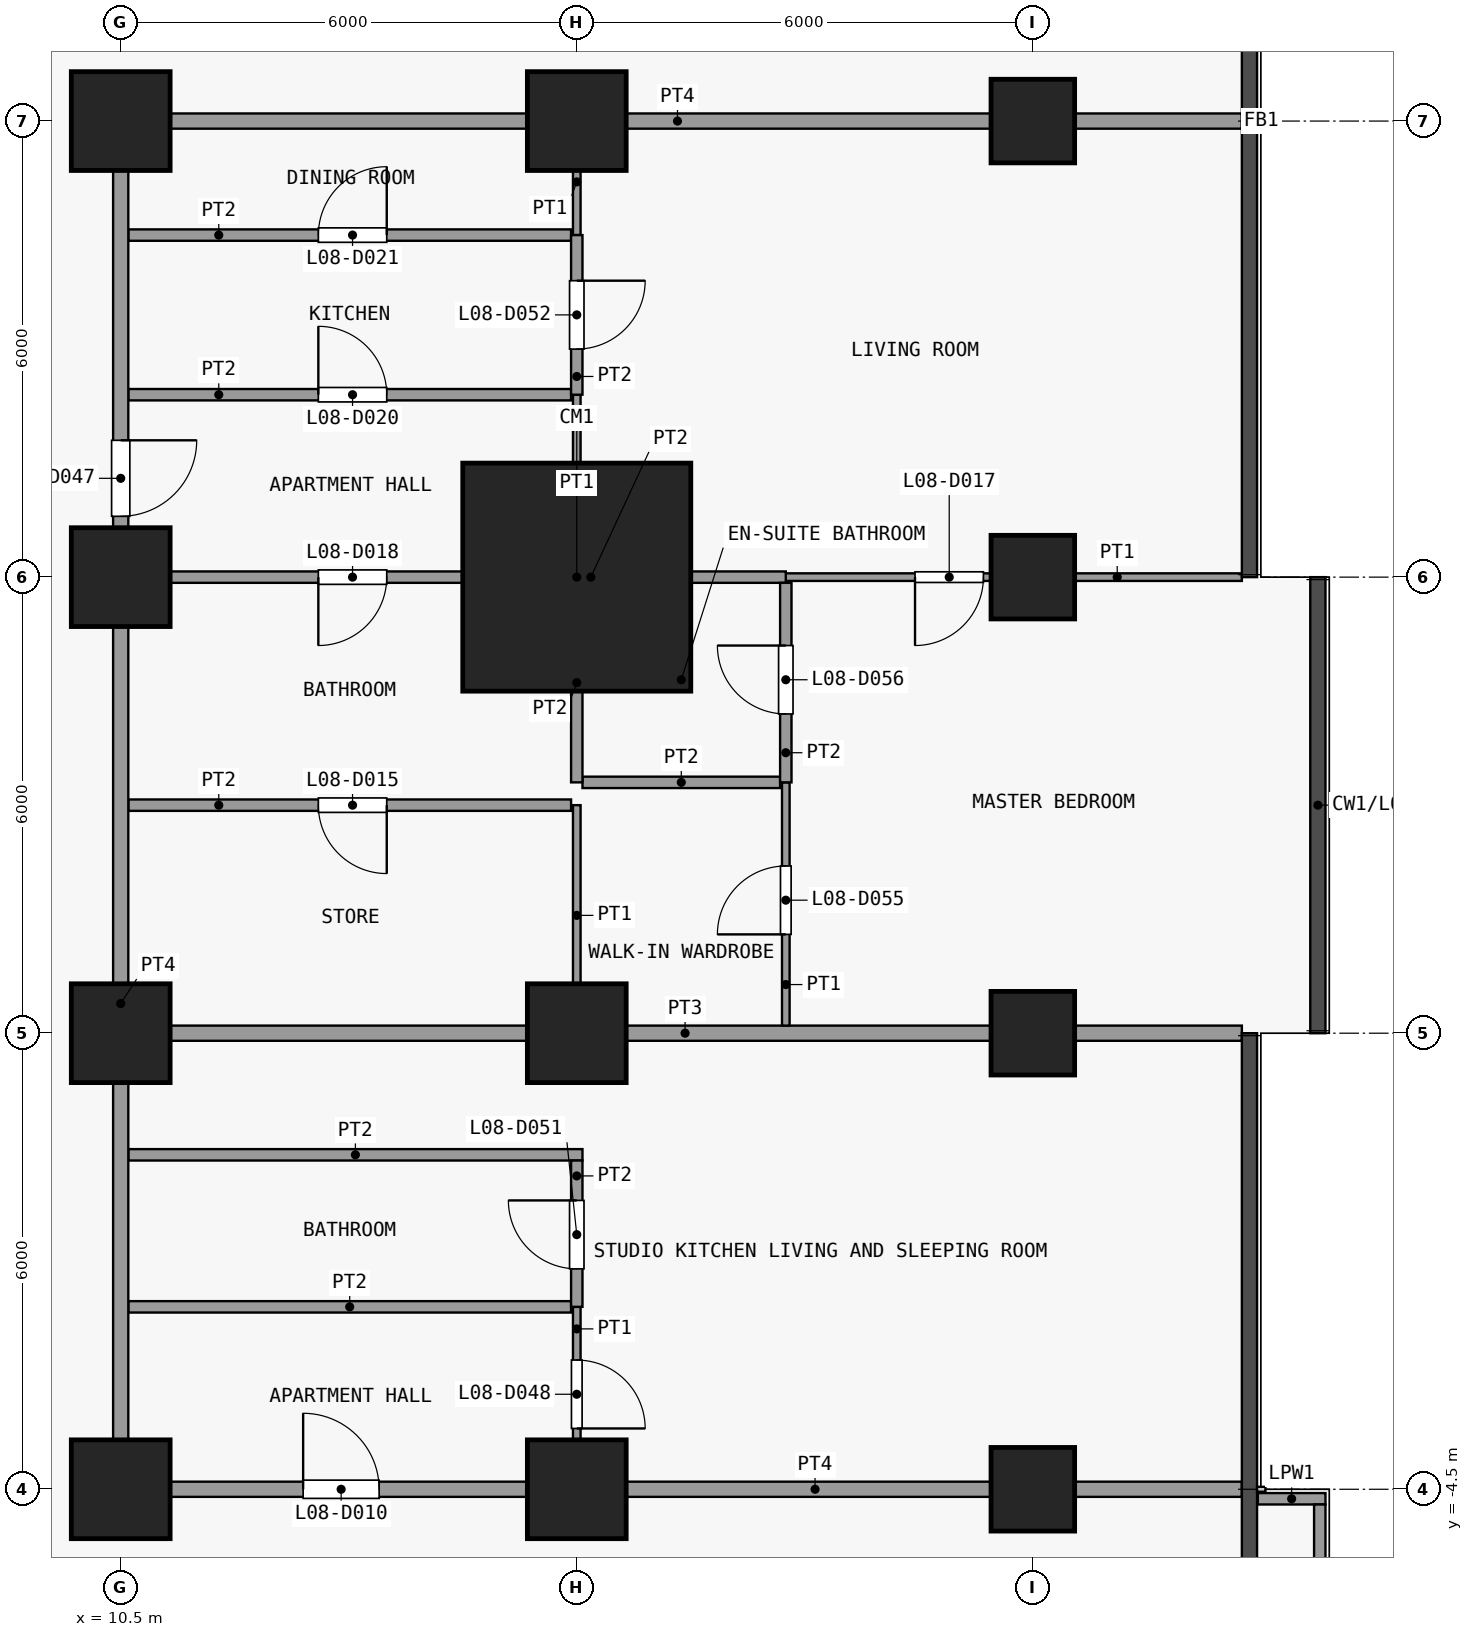
"""IFC4 building model, lengths in metres.
Left out: names, types, materials, properties, quantities, classifications, styles, units other than length and angle.
Written with IfcOpenShell. Run it as: python <this file> out.ifc"""

import sys

from ifc_helpers import new_model, si_unit, direction, frame, frame_2d, origin, origin_2d, place, context, subcontext, project, spatial, rectangle, extrude, element, fill, save


model = new_model("IFC4")
c1 = context("Model", 3, precision=1e-05, world=origin(), true_north=direction((0.0, 1.0)))
c2 = subcontext(c1, "Body", "Model", "MODEL_VIEW")
j1 = project(units=[si_unit("LENGTHUNIT", "METRE"), si_unit("PLANEANGLEUNIT", "RADIAN")], contexts=[c1])
p1 = place(None, origin())
s1 = spatial("IfcSite", under=j1, at=p1, CompositionType="ELEMENT")
p2 = place(p1, origin())
s2 = spatial("IfcBuilding", under=s1, at=p2, CompositionType="ELEMENT")
p3 = place(p2, frame((0.0, 0.0, 39.7)))
s3 = spatial("IfcBuildingStorey", under=s2, at=p3, CompositionType="ELEMENT", Elevation=39.7)
for number, where, z_axis, x_axis in (
    (1, (10.5, -4.5, 0.0), (0.0, 0.0, 1.0), (1.0, 0.0, 0.0)),
    (2, (10.5, 1.5, 0.0), (0.0, 0.0, 1.0), (1.0, 0.0, 0.0)),
    (3, (10.5, 7.5, 0.0), (0.0, 0.0, 1.0), (1.0, 0.0, 0.0)),
    (4, (10.5, 13.5, 0.0), (0.0, 0.0, 1.0), (1.0, 0.0, 0.0)),
    (5, (16.5, -4.5, 0.0), (0.0, 0.0, 1.0), (1.0, 0.0, 0.0)),
    (6, (16.5, 1.5, 0.0), (0.0, 0.0, 1.0), (1.0, 0.0, 0.0)),
):
    element("IfcColumn", number, at=place(p3, frame(where, z_axis=z_axis, x_axis=x_axis)), inside=s3, PredefinedType="COLUMN", context=c2, shape_type="SweptSolid", body=[
        extrude(rectangle(XDim=1.3, YDim=1.3, at=origin_2d()), origin(), (0.0, 0.0, 1.0), 3.6),
    ])
p4 = place(p3, frame((16.5, 7.5, 0.0), z_axis=(0.0, 0.0, 1.0), x_axis=(1.0, 0.0, 0.0)))
e7 = element("IfcColumn", 7, at=p4, inside=s3, PredefinedType="COLUMN", context=c2, shape_type="SweptSolid", body=[
    extrude(rectangle(XDim=3.0, YDim=3.0, at=origin_2d()), origin(), (0.0, 0.0, 1.0), 3.6),
])
p5 = place(p3, frame((16.5, 13.5, 0.0), z_axis=(0.0, 0.0, 1.0), x_axis=(1.0, 0.0, 0.0)))
e8 = element("IfcColumn", 8, at=p5, inside=s3, PredefinedType="COLUMN", context=c2, shape_type="SweptSolid", body=[
    extrude(rectangle(XDim=1.3, YDim=1.3, at=origin_2d()), origin(), (0.0, 0.0, 1.0), 3.6),
])
for number, where, z_axis, x_axis in (
    (9, (22.5, -4.5, 0.0), (0.0, 0.0, 1.0), (1.0, 0.0, 0.0)),
    (10, (22.5, 1.5, 0.0), (0.0, 0.0, 1.0), (1.0, 0.0, 0.0)),
    (11, (22.5, 7.5, 0.0), (0.0, 0.0, 1.0), (1.0, 0.0, 0.0)),
    (12, (22.5, 13.5, 0.0), (0.0, 0.0, 1.0), (1.0, 0.0, 0.0)),
):
    element("IfcColumn", number, at=place(p3, frame(where, z_axis=z_axis, x_axis=x_axis)), inside=s3, PredefinedType="COLUMN", context=c2, shape_type="SweptSolid", body=[
        extrude(rectangle(XDim=1.1, YDim=1.1, at=origin_2d()), origin(), (0.0, 0.0, 1.0), 3.6),
    ])
p6 = place(p3, frame((25.46, -4.625, 0.0), z_axis=(0.0, 0.0, 1.0), x_axis=(1.0, 0.0, 0.0)))
e13 = element("IfcWall", 13, at=p6, inside=s3, PredefinedType="PARAPET", context=c2, shape_type="SweptSolid", body=[
    extrude(rectangle(XDim=0.89, YDim=0.15, at=frame_2d((0.445, 0.0))), origin(), (0.0, 0.0, 1.0), 1.15),
])
p7 = place(p3, frame((26.275, -4.7, 0.0), z_axis=(0.0, 0.0, 1.0), x_axis=(0.0, -1.0, 0.0)))
e14 = element("IfcWall", 14, at=p7, inside=s3, PredefinedType="PARAPET", context=c2, shape_type="SweptSolid", body=[
    extrude(rectangle(XDim=8.75, YDim=0.15, at=frame_2d((4.375, 0.0))), origin(), (0.0, 0.0, 1.0), 1.15),
])
p8 = place(p3, frame((10.4, -4.5, 0.0), z_axis=(0.0, 0.0, 1.0), x_axis=(1.0, 0.0, 0.0)))
e15 = element("IfcWall", 15, at=p8, inside=s3, PredefinedType="PARTITIONING", context=c2, shape_type="SweptSolid", body=[
    extrude(rectangle(XDim=14.85, YDim=0.2, at=frame_2d((7.425, 0.0))), origin(), (0.0, 0.0, 1.0), 3.3),
])
p9 = place(p8, frame((2.5, 0.0, 0.0)))
e16 = element("IfcOpeningElement", 16, at=p9, cuts=e15, PredefinedType="OPENING", context=c2, shape_type="SweptSolid", body=[
    extrude(rectangle(XDim=1.0, YDim=2.1, at=frame_2d((0.5, 1.05))), frame((0.0, 0.11, 0.0), z_axis=(0.0, -1.0, 0.0), x_axis=(1.0, 0.0, 0.0)), (0.0, 0.0, 1.0), 0.22),
])
p10 = place(p3, frame((10.6, -2.1, 0.0), z_axis=(0.0, 0.0, 1.0), x_axis=(1.0, 0.0, 0.0)))
e17 = element("IfcWall", 17, at=p10, inside=s3, PredefinedType="PARTITIONING", context=c2, shape_type="SweptSolid", body=[
    extrude(rectangle(XDim=5.825, YDim=0.15, at=frame_2d((2.913, 0.0))), origin(), (0.0, 0.0, 1.0), 3.3),
])
p11 = place(p3, frame((10.6, -0.1, 0.0), z_axis=(0.0, 0.0, 1.0), x_axis=(1.0, 0.0, 0.0)))
e18 = element("IfcWall", 18, at=p11, inside=s3, PredefinedType="PARTITIONING", context=c2, shape_type="SweptSolid", body=[
    extrude(rectangle(XDim=5.975, YDim=0.15, at=frame_2d((2.987, 0.0))), origin(), (0.0, 0.0, 1.0), 3.3),
])
p12 = place(p3, frame((10.6, 1.5, 0.0), z_axis=(0.0, 0.0, 1.0), x_axis=(1.0, 0.0, 0.0)))
e19 = element("IfcWall", 19, at=p12, inside=s3, PredefinedType="PARTITIONING", context=c2, shape_type="SweptSolid", body=[
    extrude(rectangle(XDim=14.65, YDim=0.2, at=frame_2d((7.325, 0.0))), origin(), (0.0, 0.0, 1.0), 3.3),
])
p13 = place(p3, frame((10.6, 4.5, 0.0), z_axis=(0.0, 0.0, 1.0), x_axis=(1.0, 0.0, 0.0)))
e20 = element("IfcWall", 20, at=p13, inside=s3, PredefinedType="PARTITIONING", context=c2, shape_type="SweptSolid", body=[
    extrude(rectangle(XDim=5.825, YDim=0.15, at=frame_2d((2.913, 0.0))), origin(), (0.0, 0.0, 1.0), 3.3),
])
p14 = place(p13, frame((2.5, 0.0, 0.0)))
e21 = element("IfcOpeningElement", 21, at=p14, cuts=e20, PredefinedType="OPENING", context=c2, shape_type="SweptSolid", body=[
    extrude(rectangle(XDim=0.9, YDim=2.1, at=frame_2d((0.45, 1.05))), frame((0.0, 0.085, 0.0), z_axis=(0.0, -1.0, 0.0), x_axis=(1.0, 0.0, 0.0)), (0.0, 0.0, 1.0), 0.17),
])
p15 = place(p3, frame((16.575, 4.8, 0.0), z_axis=(0.0, 0.0, 1.0), x_axis=(1.0, 0.0, 0.0)))
e22 = element("IfcWall", 22, at=p15, inside=s3, PredefinedType="PARTITIONING", context=c2, shape_type="SweptSolid", body=[
    extrude(rectangle(XDim=2.6, YDim=0.15, at=frame_2d((1.3, 0.0))), origin(), (0.0, 0.0, 1.0), 3.3),
])
p16 = place(p3, frame((19.25, 7.5, 0.0), z_axis=(0.0, 0.0, 1.0), x_axis=(1.0, 0.0, 0.0)))
e23 = element("IfcWall", 23, at=p16, inside=s3, PredefinedType="PARTITIONING", context=c2, shape_type="SweptSolid", body=[
    extrude(rectangle(XDim=6.0, YDim=0.1, at=frame_2d((3.0, 0.0))), origin(), (0.0, 0.0, 1.0), 3.3),
])
p17 = place(p16, frame((1.7, 0.0, 0.0)))
e24 = element("IfcOpeningElement", 24, at=p17, cuts=e23, PredefinedType="OPENING", context=c2, shape_type="SweptSolid", body=[
    extrude(rectangle(XDim=0.9, YDim=2.1, at=frame_2d((0.45, 1.05))), frame((0.0, 0.06, 0.0), z_axis=(0.0, -1.0, 0.0), x_axis=(1.0, 0.0, 0.0)), (0.0, 0.0, 1.0), 0.12),
])
p18 = place(p3, frame((10.6, 7.5, 0.0), z_axis=(0.0, 0.0, 1.0), x_axis=(1.0, 0.0, 0.0)))
e25 = element("IfcWall", 25, at=p18, inside=s3, PredefinedType="PARTITIONING", context=c2, shape_type="SweptSolid", body=[
    extrude(rectangle(XDim=8.65, YDim=0.15, at=frame_2d((4.325, 0.0))), origin(), (0.0, 0.0, 1.0), 3.3),
])
p19 = place(p18, frame((2.5, 0.0, 0.0)))
e26 = element("IfcOpeningElement", 26, at=p19, cuts=e25, PredefinedType="OPENING", context=c2, shape_type="SweptSolid", body=[
    extrude(rectangle(XDim=0.9, YDim=2.1, at=frame_2d((0.45, 1.05))), frame((0.0, 0.085, 0.0), z_axis=(0.0, -1.0, 0.0), x_axis=(1.0, 0.0, 0.0)), (0.0, 0.0, 1.0), 0.17),
])
p20 = place(p3, frame((10.6, 9.9, 0.0), z_axis=(0.0, 0.0, 1.0), x_axis=(1.0, 0.0, 0.0)))
e27 = element("IfcWall", 27, at=p20, inside=s3, PredefinedType="PARTITIONING", context=c2, shape_type="SweptSolid", body=[
    extrude(rectangle(XDim=5.825, YDim=0.15, at=frame_2d((2.913, 0.0))), origin(), (0.0, 0.0, 1.0), 3.3),
])
p21 = place(p20, frame((2.5, 0.0, 0.0)))
e28 = element("IfcOpeningElement", 28, at=p21, cuts=e27, PredefinedType="OPENING", context=c2, shape_type="SweptSolid", body=[
    extrude(rectangle(XDim=0.9, YDim=2.1, at=frame_2d((0.45, 1.05))), frame((0.0, 0.085, 0.0), z_axis=(0.0, -1.0, 0.0), x_axis=(1.0, 0.0, 0.0)), (0.0, 0.0, 1.0), 0.17),
])
p22 = place(p3, frame((10.6, 12.0, 0.0), z_axis=(0.0, 0.0, 1.0), x_axis=(1.0, 0.0, 0.0)))
e29 = element("IfcWall", 29, at=p22, inside=s3, PredefinedType="PARTITIONING", context=c2, shape_type="SweptSolid", body=[
    extrude(rectangle(XDim=5.825, YDim=0.15, at=frame_2d((2.913, 0.0))), origin(), (0.0, 0.0, 1.0), 3.3),
])
p23 = place(p22, frame((2.5, 0.0, 0.0)))
e30 = element("IfcOpeningElement", 30, at=p23, cuts=e29, PredefinedType="OPENING", context=c2, shape_type="SweptSolid", body=[
    extrude(rectangle(XDim=0.9, YDim=2.1, at=frame_2d((0.45, 1.05))), frame((0.0, 0.085, 0.0), z_axis=(0.0, -1.0, 0.0), x_axis=(1.0, 0.0, 0.0)), (0.0, 0.0, 1.0), 0.17),
])
p24 = place(p3, frame((10.4, 13.5, 0.0), z_axis=(0.0, 0.0, 1.0), x_axis=(1.0, 0.0, 0.0)))
e31 = element("IfcWall", 31, at=p24, inside=s3, PredefinedType="PARTITIONING", context=c2, shape_type="SweptSolid", body=[
    extrude(rectangle(XDim=14.85, YDim=0.2, at=frame_2d((7.425, 0.0))), origin(), (0.0, 0.0, 1.0), 3.3),
])
p25 = place(p3, frame((10.5, -4.4, 0.0), z_axis=(0.0, 0.0, 1.0), x_axis=(0.0, 1.0, 0.0)))
e32 = element("IfcWall", 32, at=p25, inside=s3, PredefinedType="PARTITIONING", context=c2, shape_type="SweptSolid", body=[
    extrude(rectangle(XDim=17.8, YDim=0.2, at=frame_2d((8.9, 0.0))), origin(), (0.0, 0.0, 1.0), 3.3),
])
p26 = place(p25, frame((12.7, 0.0, 0.0)))
e33 = element("IfcOpeningElement", 33, at=p26, cuts=e32, PredefinedType="OPENING", context=c2, shape_type="SweptSolid", body=[
    extrude(rectangle(XDim=1.0, YDim=2.1, at=frame_2d((0.5, 1.05))), frame((0.0, 0.11, 0.0), z_axis=(0.0, -1.0, 0.0), x_axis=(1.0, 0.0, 0.0)), (0.0, 0.0, 1.0), 0.22),
])
p27 = place(p3, frame((16.5, -4.4, 0.0), z_axis=(0.0, 0.0, 1.0), x_axis=(0.0, 1.0, 0.0)))
e34 = element("IfcWall", 34, at=p27, inside=s3, PredefinedType="PARTITIONING", context=c2, shape_type="SweptSolid", body=[
    extrude(rectangle(XDim=2.3, YDim=0.1, at=frame_2d((1.15, 0.0))), origin(), (0.0, 0.0, 1.0), 3.3),
])
p28 = place(p27, frame((0.7, 0.0, 0.0)))
e35 = element("IfcOpeningElement", 35, at=p28, cuts=e34, PredefinedType="OPENING", context=c2, shape_type="SweptSolid", body=[
    extrude(rectangle(XDim=0.9, YDim=2.1, at=frame_2d((0.45, 1.05))), frame((0.0, 0.06, 0.0), z_axis=(0.0, -1.0, 0.0), x_axis=(1.0, 0.0, 0.0)), (0.0, 0.0, 1.0), 0.12),
])
p29 = place(p3, frame((16.5, 1.6, 0.0), z_axis=(0.0, 0.0, 1.0), x_axis=(0.0, 1.0, 0.0)))
e36 = element("IfcWall", 36, at=p29, inside=s3, PredefinedType="PARTITIONING", context=c2, shape_type="SweptSolid", body=[
    extrude(rectangle(XDim=2.9, YDim=0.1, at=frame_2d((1.45, 0.0))), origin(), (0.0, 0.0, 1.0), 3.3),
])
p30 = place(p3, frame((16.5, 7.575, 0.0), z_axis=(0.0, 0.0, 1.0), x_axis=(0.0, 1.0, 0.0)))
e37 = element("IfcWall", 37, at=p30, inside=s3, PredefinedType="PARTITIONING", context=c2, shape_type="SweptSolid", body=[
    extrude(rectangle(XDim=2.325, YDim=0.1, at=frame_2d((1.163, 0.0))), origin(), (0.0, 0.0, 1.0), 3.3),
])
p31 = place(p3, frame((16.5, 12.0, 0.0), z_axis=(0.0, 0.0, 1.0), x_axis=(0.0, 1.0, 0.0)))
e38 = element("IfcWall", 38, at=p31, inside=s3, PredefinedType="PARTITIONING", context=c2, shape_type="SweptSolid", body=[
    extrude(rectangle(XDim=1.4, YDim=0.1, at=frame_2d((0.7, 0.0))), origin(), (0.0, 0.0, 1.0), 3.3),
])
p32 = place(p3, frame((16.5, -2.1, 0.0), z_axis=(0.0, 0.0, 1.0), x_axis=(0.0, 1.0, 0.0)))
e39 = element("IfcWall", 39, at=p32, inside=s3, PredefinedType="PARTITIONING", context=c2, shape_type="SweptSolid", body=[
    extrude(rectangle(XDim=1.925, YDim=0.15, at=frame_2d((0.962, 0.0))), origin(), (0.0, 0.0, 1.0), 3.3),
])
p33 = place(p32, frame((0.5, 0.0, 0.0)))
e40 = element("IfcOpeningElement", 40, at=p33, cuts=e39, PredefinedType="OPENING", context=c2, shape_type="SweptSolid", body=[
    extrude(rectangle(XDim=0.9, YDim=2.1, at=frame_2d((0.45, 1.05))), frame((0.0, 0.085, 0.0), z_axis=(0.0, -1.0, 0.0), x_axis=(1.0, 0.0, 0.0)), (0.0, 0.0, 1.0), 0.17),
])
p34 = place(p3, frame((16.5, 4.8, 0.0), z_axis=(0.0, 0.0, 1.0), x_axis=(0.0, 1.0, 0.0)))
e41 = element("IfcWall", 41, at=p34, inside=s3, PredefinedType="PARTITIONING", context=c2, shape_type="SweptSolid", body=[
    extrude(rectangle(XDim=2.625, YDim=0.15, at=frame_2d((1.312, 0.0))), origin(), (0.0, 0.0, 1.0), 3.3),
])
p35 = place(p3, frame((16.5, 9.9, 0.0), z_axis=(0.0, 0.0, 1.0), x_axis=(0.0, 1.0, 0.0)))
e42 = element("IfcWall", 42, at=p35, inside=s3, PredefinedType="PARTITIONING", context=c2, shape_type="SweptSolid", body=[
    extrude(rectangle(XDim=2.1, YDim=0.15, at=frame_2d((1.05, 0.0))), origin(), (0.0, 0.0, 1.0), 3.3),
])
p36 = place(p35, frame((0.6, 0.0, 0.0)))
e43 = element("IfcOpeningElement", 43, at=p36, cuts=e42, PredefinedType="OPENING", context=c2, shape_type="SweptSolid", body=[
    extrude(rectangle(XDim=0.9, YDim=2.1, at=frame_2d((0.45, 1.05))), frame((0.0, 0.085, 0.0), z_axis=(0.0, -1.0, 0.0), x_axis=(1.0, 0.0, 0.0)), (0.0, 0.0, 1.0), 0.17),
])
p37 = place(p3, frame((19.25, 1.6, 0.0), z_axis=(0.0, 0.0, 1.0), x_axis=(0.0, 1.0, 0.0)))
e44 = element("IfcWall", 44, at=p37, inside=s3, PredefinedType="PARTITIONING", context=c2, shape_type="SweptSolid", body=[
    extrude(rectangle(XDim=3.2, YDim=0.1, at=frame_2d((1.6, 0.0))), origin(), (0.0, 0.0, 1.0), 3.3),
])
p38 = place(p37, frame((1.2, 0.0, 0.0)))
e45 = element("IfcOpeningElement", 45, at=p38, cuts=e44, PredefinedType="OPENING", context=c2, shape_type="SweptSolid", body=[
    extrude(rectangle(XDim=0.9, YDim=2.1, at=frame_2d((0.45, 1.05))), frame((0.0, 0.06, 0.0), z_axis=(0.0, -1.0, 0.0), x_axis=(1.0, 0.0, 0.0)), (0.0, 0.0, 1.0), 0.12),
])
p39 = place(p3, frame((19.25, 4.8, 0.0), z_axis=(0.0, 0.0, 1.0), x_axis=(0.0, 1.0, 0.0)))
e46 = element("IfcWall", 46, at=p39, inside=s3, PredefinedType="PARTITIONING", context=c2, shape_type="SweptSolid", body=[
    extrude(rectangle(XDim=2.625, YDim=0.15, at=frame_2d((1.312, 0.0))), origin(), (0.0, 0.0, 1.0), 3.3),
])
p40 = place(p39, frame((0.9, 0.0, 0.0)))
e47 = element("IfcOpeningElement", 47, at=p40, cuts=e46, PredefinedType="OPENING", context=c2, shape_type="SweptSolid", body=[
    extrude(rectangle(XDim=0.9, YDim=2.1, at=frame_2d((0.45, 1.05))), frame((0.0, 0.085, 0.0), z_axis=(0.0, -1.0, 0.0), x_axis=(1.0, 0.0, 0.0)), (0.0, 0.0, 1.0), 0.17),
])
p41 = place(p9, origin())
e48 = element("IfcDoor", 48, at=p41, inside=s3, OperationType="SINGLE_SWING_RIGHT", PredefinedType="DOOR", context=c2, shape_type="SweptSolid", body=[
    extrude(rectangle(XDim=1.0, YDim=2.1, at=frame_2d((0.5, 1.05))), frame((0.0, 0.025, 0.0), z_axis=(0.0, -1.0, 0.0), x_axis=(1.0, 0.0, 0.0)), (0.0, 0.0, 1.0), 0.05),
])
fill(e16, e48)
p42 = place(p14, origin())
e49 = element("IfcDoor", 49, at=p42, inside=s3, OperationType="SINGLE_SWING_RIGHT", PredefinedType="DOOR", context=c2, shape_type="SweptSolid", body=[
    extrude(rectangle(XDim=0.9, YDim=2.1, at=frame_2d((0.45, 1.05))), frame((0.0, 0.025, 0.0), z_axis=(0.0, -1.0, 0.0), x_axis=(1.0, 0.0, 0.0)), (0.0, 0.0, 1.0), 0.05),
])
fill(e21, e49)
p43 = place(p17, origin())
e50 = element("IfcDoor", 50, at=p43, inside=s3, OperationType="SINGLE_SWING_LEFT", PredefinedType="DOOR", context=c2, shape_type="SweptSolid", body=[
    extrude(rectangle(XDim=0.9, YDim=2.1, at=frame_2d((0.45, 1.05))), frame((0.0, 0.025, 0.0), z_axis=(0.0, -1.0, 0.0), x_axis=(1.0, 0.0, 0.0)), (0.0, 0.0, 1.0), 0.05),
])
fill(e24, e50)
p44 = place(p19, origin())
e51 = element("IfcDoor", 51, at=p44, inside=s3, OperationType="SINGLE_SWING_LEFT", PredefinedType="DOOR", context=c2, shape_type="SweptSolid", body=[
    extrude(rectangle(XDim=0.9, YDim=2.1, at=frame_2d((0.45, 1.05))), frame((0.0, 0.025, 0.0), z_axis=(0.0, -1.0, 0.0), x_axis=(1.0, 0.0, 0.0)), (0.0, 0.0, 1.0), 0.05),
])
fill(e26, e51)
p45 = place(p21, origin())
e52 = element("IfcDoor", 52, at=p45, inside=s3, OperationType="SINGLE_SWING_RIGHT", PredefinedType="DOOR", context=c2, shape_type="SweptSolid", body=[
    extrude(rectangle(XDim=0.9, YDim=2.1, at=frame_2d((0.45, 1.05))), frame((0.0, 0.025, 0.0), z_axis=(0.0, -1.0, 0.0), x_axis=(1.0, 0.0, 0.0)), (0.0, 0.0, 1.0), 0.05),
])
fill(e28, e52)
p46 = place(p23, origin())
e53 = element("IfcDoor", 53, at=p46, inside=s3, OperationType="SINGLE_SWING_LEFT", PredefinedType="DOOR", context=c2, shape_type="SweptSolid", body=[
    extrude(rectangle(XDim=0.9, YDim=2.1, at=frame_2d((0.45, 1.05))), frame((0.0, 0.025, 0.0), z_axis=(0.0, -1.0, 0.0), x_axis=(1.0, 0.0, 0.0)), (0.0, 0.0, 1.0), 0.05),
])
fill(e30, e53)
p47 = place(p26, origin())
e54 = element("IfcDoor", 54, at=p47, inside=s3, OperationType="SINGLE_SWING_RIGHT", PredefinedType="DOOR", context=c2, shape_type="SweptSolid", body=[
    extrude(rectangle(XDim=1.0, YDim=2.1, at=frame_2d((0.5, 1.05))), frame((0.0, 0.025, 0.0), z_axis=(0.0, -1.0, 0.0), x_axis=(1.0, 0.0, 0.0)), (0.0, 0.0, 1.0), 0.05),
])
fill(e33, e54)
p48 = place(p28, origin())
e55 = element("IfcDoor", 55, at=p48, inside=s3, OperationType="SINGLE_SWING_LEFT", PredefinedType="DOOR", context=c2, shape_type="SweptSolid", body=[
    extrude(rectangle(XDim=0.9, YDim=2.1, at=frame_2d((0.45, 1.05))), frame((0.0, 0.025, 0.0), z_axis=(0.0, -1.0, 0.0), x_axis=(1.0, 0.0, 0.0)), (0.0, 0.0, 1.0), 0.05),
])
fill(e35, e55)
p49 = place(p33, origin())
e56 = element("IfcDoor", 56, at=p49, inside=s3, OperationType="SINGLE_SWING_LEFT", PredefinedType="DOOR", context=c2, shape_type="SweptSolid", body=[
    extrude(rectangle(XDim=0.9, YDim=2.1, at=frame_2d((0.45, 1.05))), frame((0.0, 0.025, 0.0), z_axis=(0.0, -1.0, 0.0), x_axis=(1.0, 0.0, 0.0)), (0.0, 0.0, 1.0), 0.05),
])
fill(e40, e56)
p50 = place(p36, origin())
e57 = element("IfcDoor", 57, at=p50, inside=s3, OperationType="SINGLE_SWING_RIGHT", PredefinedType="DOOR", context=c2, shape_type="SweptSolid", body=[
    extrude(rectangle(XDim=0.9, YDim=2.1, at=frame_2d((0.45, 1.05))), frame((0.0, 0.025, 0.0), z_axis=(0.0, -1.0, 0.0), x_axis=(1.0, 0.0, 0.0)), (0.0, 0.0, 1.0), 0.05),
])
fill(e43, e57)
p51 = place(p38, origin())
e58 = element("IfcDoor", 58, at=p51, inside=s3, OperationType="SINGLE_SWING_RIGHT", PredefinedType="DOOR", context=c2, shape_type="SweptSolid", body=[
    extrude(rectangle(XDim=0.9, YDim=2.1, at=frame_2d((0.45, 1.05))), frame((0.0, 0.025, 0.0), z_axis=(0.0, -1.0, 0.0), x_axis=(1.0, 0.0, 0.0)), (0.0, 0.0, 1.0), 0.05),
])
fill(e45, e58)
p52 = place(p40, origin())
e59 = element("IfcDoor", 59, at=p52, inside=s3, OperationType="SINGLE_SWING_LEFT", PredefinedType="DOOR", context=c2, shape_type="SweptSolid", body=[
    extrude(rectangle(XDim=0.9, YDim=2.1, at=frame_2d((0.45, 1.05))), frame((0.0, 0.025, 0.0), z_axis=(0.0, -1.0, 0.0), x_axis=(1.0, 0.0, 0.0)), (0.0, 0.0, 1.0), 0.05),
])
fill(e47, e59)
save(model, sys.argv[1])
